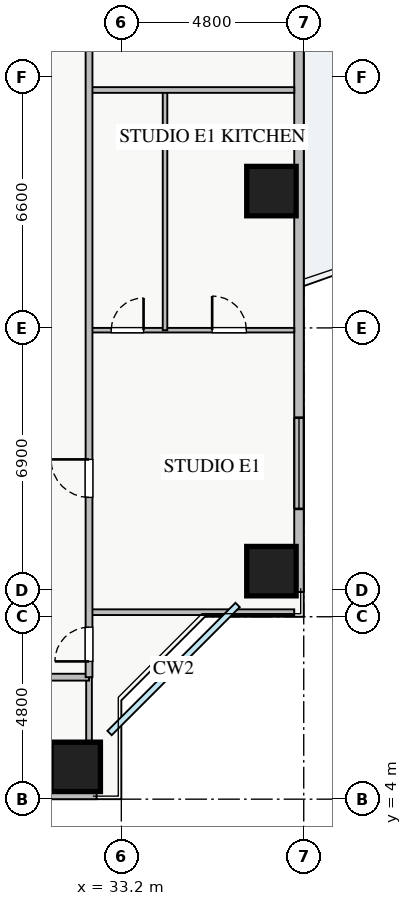
"""IFC4 building model, lengths in metres.
Left out: names, types, materials, properties, quantities, classifications, styles, units other than length and angle.
Written with IfcOpenShell. Run it as: python <this file> out.ifc"""

import sys

from ifc_helpers import new_model, si_unit, direction, frame, frame_2d, origin, origin_2d, place, context, subcontext, project, spatial, rectangle, extrude, source, transform, mapped, element, fill, save


model = new_model("IFC4")
c1 = context("Model", 3, precision=1e-05, world=origin(), true_north=direction((0.0, 1.0)))
c2 = subcontext(c1, "Body", "Model", "MODEL_VIEW")
j1 = project(units=[si_unit("LENGTHUNIT", "METRE"), si_unit("PLANEANGLEUNIT", "RADIAN")], contexts=[c1])
p1 = place(None, origin())
s1 = spatial("IfcSite", under=j1, at=p1, CompositionType="ELEMENT")
p2 = place(p1, origin())
s2 = spatial("IfcBuilding", under=s1, at=p2, CompositionType="ELEMENT")
p3 = place(p2, frame((0.0, 0.0, 89.25)))
s3 = spatial("IfcBuildingStorey", under=s2, at=p3, CompositionType="ELEMENT", Elevation=89.25)
m1 = source(origin(), c2, "Body", "SweptSolid", [
    extrude(rectangle(XDim=1.3, YDim=1.3, at=origin_2d()), origin(), (0.0, 0.0, 1.0), 3.25),
])
for number, where, z_axis, x_axis in (
    (1, (32.0, 4.85, 0.0), (0.0, 0.0, 1.0), (1.0, 0.0, 0.0)),
    (2, (37.15, 10.0, 0.0), (0.0, 0.0, 1.0), (1.0, 0.0, 0.0)),
    (3, (37.15, 20.0, 0.0), (0.0, 0.0, 1.0), (1.0, 0.0, 0.0)),
):
    element("IfcColumn", number, at=place(p3, frame(where, z_axis=z_axis, x_axis=x_axis)), inside=s3, PredefinedType="COLUMN", context=c2, shape_type="MappedRepresentation", body=[
        mapped(m1, transform((0.0, 0.0, 0.0), x_axis=(1.0, 0.0, 0.0), y_axis=(0.0, 1.0, 0.0), z_axis=(0.0, 0.0, 1.0), scale=1.0)),
    ])
p4 = place(p3, frame((5.45, 4.125, 0.0), z_axis=(0.0, 0.0, 1.0), x_axis=(1.0, 0.0, 0.0)))
e4 = element("IfcWall", 4, at=p4, inside=s3, PredefinedType="STANDARD", context=c2, shape_type="SweptSolid", body=[
    extrude(rectangle(XDim=27.1, YDim=0.25, at=frame_2d((13.55, 0.0))), origin(), (0.0, 0.0, 1.0), 2.57),
])
p5 = place(p4, frame((14.4, 0.0, 0.0)))
e5 = element("IfcOpeningElement", 5, at=p5, cuts=e4, PredefinedType="OPENING", context=c2, shape_type="SweptSolid", body=[
    extrude(rectangle(XDim=1.2, YDim=2.1, at=frame_2d((0.6, 1.05))), frame((0.0, 0.135, 0.0), z_axis=(0.0, -1.0, 0.0), x_axis=(1.0, 0.0, 0.0)), (0.0, 0.0, 1.0), 0.27),
])
p6 = place(p4, frame((1.45, 0.0, 0.9)))
e6 = element("IfcOpeningElement", 6, at=p6, cuts=e4, PredefinedType="OPENING", context=c2, shape_type="SweptSolid", body=[
    extrude(rectangle(XDim=1.5, YDim=1.5, at=frame_2d((0.75, 0.75))), frame((0.0, 0.135, 0.0), z_axis=(0.0, -1.0, 0.0), x_axis=(1.0, 0.0, 0.0)), (0.0, 0.0, 1.0), 0.27),
])
p7 = place(p4, frame((9.263, 0.0, 0.9)))
e7 = element("IfcOpeningElement", 7, at=p7, cuts=e4, PredefinedType="OPENING", context=c2, shape_type="SweptSolid", body=[
    extrude(rectangle(XDim=1.8, YDim=1.45, at=frame_2d((0.9, 0.725))), frame((0.0, 0.135, 0.0), z_axis=(0.0, -1.0, 0.0), x_axis=(1.0, 0.0, 0.0)), (0.0, 0.0, 1.0), 0.27),
])
p8 = place(p4, frame((16.188, 0.0, 0.9)))
e8 = element("IfcOpeningElement", 8, at=p8, cuts=e4, PredefinedType="OPENING", context=c2, shape_type="SweptSolid", body=[
    extrude(rectangle(XDim=1.5, YDim=1.45, at=frame_2d((0.75, 0.725))), frame((0.0, 0.135, 0.0), z_axis=(0.0, -1.0, 0.0), x_axis=(1.0, 0.0, 0.0)), (0.0, 0.0, 1.0), 0.27),
])
p9 = place(p4, frame((22.663, 0.0, 0.9)))
e9 = element("IfcOpeningElement", 9, at=p9, cuts=e4, PredefinedType="OPENING", context=c2, shape_type="SweptSolid", body=[
    extrude(rectangle(XDim=2.1, YDim=1.48, at=frame_2d((1.05, 0.74))), frame((0.0, 0.135, 0.0), z_axis=(0.0, -1.0, 0.0), x_axis=(1.0, 0.0, 0.0)), (0.0, 0.0, 1.0), 0.27),
])
p10 = place(p4, frame((5.084, 0.0, 0.9)))
e10 = element("IfcOpeningElement", 10, at=p10, cuts=e4, PredefinedType="OPENING", context=c2, shape_type="SweptSolid", body=[
    extrude(rectangle(XDim=2.4, YDim=1.5, at=frame_2d((1.2, 0.75))), frame((0.0, 0.135, 0.0), z_axis=(0.0, -1.0, 0.0), x_axis=(1.0, 0.0, 0.0)), (0.0, 0.0, 1.0), 0.27),
])
p11 = place(p3, frame((37.875, 9.45, 0.0), z_axis=(0.0, 0.0, 1.0), x_axis=(0.0, 1.0, 0.0)))
e11 = element("IfcWall", 11, at=p11, inside=s3, PredefinedType="STANDARD", context=c2, shape_type="SweptSolid", body=[
    extrude(rectangle(XDim=27.1, YDim=0.25, at=frame_2d((13.55, 0.0))), origin(), (0.0, 0.0, 1.0), 2.57),
])
p12 = place(p11, frame((14.4, 0.0, 0.0)))
e12 = element("IfcOpeningElement", 12, at=p12, cuts=e11, PredefinedType="OPENING", context=c2, shape_type="SweptSolid", body=[
    extrude(rectangle(XDim=1.2, YDim=2.1, at=frame_2d((0.6, 1.05))), frame((0.0, 0.135, 0.0), z_axis=(0.0, -1.0, 0.0), x_axis=(1.0, 0.0, 0.0)), (0.0, 0.0, 1.0), 0.27),
])
p13 = place(p11, frame((2.188, 0.0, 0.9)))
e13 = element("IfcOpeningElement", 13, at=p13, cuts=e11, PredefinedType="OPENING", context=c2, shape_type="SweptSolid", body=[
    extrude(rectangle(XDim=2.4, YDim=1.48, at=frame_2d((1.2, 0.74))), frame((0.0, 0.135, 0.0), z_axis=(0.0, -1.0, 0.0), x_axis=(1.0, 0.0, 0.0)), (0.0, 0.0, 1.0), 0.27),
])
p14 = place(p11, frame((22.663, 0.0, 0.9)))
e14 = element("IfcOpeningElement", 14, at=p14, cuts=e11, PredefinedType="OPENING", context=c2, shape_type="SweptSolid", body=[
    extrude(rectangle(XDim=2.1, YDim=1.48, at=frame_2d((1.05, 0.74))), frame((0.0, 0.135, 0.0), z_axis=(0.0, -1.0, 0.0), x_axis=(1.0, 0.0, 0.0)), (0.0, 0.0, 1.0), 0.27),
])
p15 = place(p11, frame((17.365, 0.0, 0.9)))
e15 = element("IfcOpeningElement", 15, at=p15, cuts=e11, PredefinedType="OPENING", context=c2, shape_type="SweptSolid", body=[
    extrude(rectangle(XDim=0.9, YDim=1.2, at=frame_2d((0.45, 0.6))), frame((0.0, 0.135, 0.0), z_axis=(0.0, -1.0, 0.0), x_axis=(1.0, 0.0, 0.0)), (0.0, 0.0, 1.0), 0.27),
])
p16 = place(p3, frame((32.35, 4.25, 0.0), z_axis=(0.0, 0.0, 1.0), x_axis=(0.0, 1.0, 0.0)))
e16 = element("IfcWall", 16, at=p16, inside=s3, PredefinedType="PARTITIONING", context=c2, shape_type="SweptSolid", body=[
    extrude(rectangle(XDim=2.96, YDim=0.15, at=frame_2d((1.48, 0.0))), origin(), (0.0, 0.0, 1.0), 3.03),
])
p17 = place(p3, frame((8.72, 7.21, 0.0), z_axis=(0.0, 0.0, 1.0), x_axis=(1.0, 0.0, 0.0)))
e17 = element("IfcWall", 17, at=p17, inside=s3, PredefinedType="PARTITIONING", context=c2, shape_type="SweptSolid", body=[
    extrude(rectangle(XDim=23.63, YDim=0.18, at=frame_2d((11.815, 0.0))), origin(), (0.0, 0.0, 1.0), 3.03),
])
p18 = place(p17, frame((3.81, 0.0, 0.0)))
e18 = element("IfcOpeningElement", 18, at=p18, cuts=e17, PredefinedType="OPENING", context=c2, shape_type="SweptSolid", body=[
    extrude(rectangle(XDim=1.0, YDim=2.05, at=frame_2d((0.5, 1.025))), frame((0.0, 0.1, 0.0), z_axis=(0.0, -1.0, 0.0), x_axis=(1.0, 0.0, 0.0)), (0.0, 0.0, 1.0), 0.2),
])
p19 = place(p17, frame((11.685, 0.0, 0.0)))
e19 = element("IfcOpeningElement", 19, at=p19, cuts=e17, PredefinedType="OPENING", context=c2, shape_type="SweptSolid", body=[
    extrude(rectangle(XDim=1.0, YDim=2.05, at=frame_2d((0.5, 1.025))), frame((0.0, 0.1, 0.0), z_axis=(0.0, -1.0, 0.0), x_axis=(1.0, 0.0, 0.0)), (0.0, 0.0, 1.0), 0.2),
])
p20 = place(p17, frame((19.19, 0.0, 0.0)))
e20 = element("IfcOpeningElement", 20, at=p20, cuts=e17, PredefinedType="OPENING", context=c2, shape_type="SweptSolid", body=[
    extrude(rectangle(XDim=1.0, YDim=2.05, at=frame_2d((0.5, 1.025))), frame((0.0, 0.1, 0.0), z_axis=(0.0, -1.0, 0.0), x_axis=(1.0, 0.0, 0.0)), (0.0, 0.0, 1.0), 0.2),
])
p21 = place(p3, frame((32.35, 8.92, 0.0), z_axis=(0.0, 0.0, 1.0), x_axis=(1.0, 0.0, 0.0)))
e21 = element("IfcWall", 21, at=p21, inside=s3, PredefinedType="PARTITIONING", context=c2, shape_type="SweptSolid", body=[
    extrude(rectangle(XDim=5.4, YDim=0.15, at=frame_2d((2.7, 0.0))), origin(), (0.0, 0.0, 1.0), 3.03),
])
p22 = place(p3, frame((32.35, 16.34, 0.0), z_axis=(0.0, 0.0, 1.0), x_axis=(1.0, 0.0, 0.0)))
e22 = element("IfcWall", 22, at=p22, inside=s3, PredefinedType="PLUMBINGWALL", context=c2, shape_type="SweptSolid", body=[
    extrude(rectangle(XDim=5.4, YDim=0.12, at=frame_2d((2.7, 0.0))), origin(), (0.0, 0.0, 1.0), 3.03),
])
p23 = place(p22, frame((0.585, 0.0, 0.0)))
e23 = element("IfcOpeningElement", 23, at=p23, cuts=e22, PredefinedType="OPENING", context=c2, shape_type="SweptSolid", body=[
    extrude(rectangle(XDim=0.85, YDim=2.05, at=frame_2d((0.425, 1.025))), frame((0.0, 0.07, 0.0), z_axis=(0.0, -1.0, 0.0), x_axis=(1.0, 0.0, 0.0)), (0.0, 0.0, 1.0), 0.14),
])
p24 = place(p22, frame((3.24, 0.0, 0.0)))
e24 = element("IfcOpeningElement", 24, at=p24, cuts=e22, PredefinedType="OPENING", context=c2, shape_type="SweptSolid", body=[
    extrude(rectangle(XDim=0.9, YDim=2.05, at=frame_2d((0.45, 1.025))), frame((0.0, 0.07, 0.0), z_axis=(0.0, -1.0, 0.0), x_axis=(1.0, 0.0, 0.0)), (0.0, 0.0, 1.0), 0.14),
])
p25 = place(p3, frame((34.35, 16.34, 0.0), z_axis=(0.0, 0.0, 1.0), x_axis=(0.0, 1.0, 0.0)))
e25 = element("IfcWall", 25, at=p25, inside=s3, PredefinedType="PLUMBINGWALL", context=c2, shape_type="SweptSolid", body=[
    extrude(rectangle(XDim=6.32, YDim=0.12, at=frame_2d((3.16, 0.0))), origin(), (0.0, 0.0, 1.0), 3.03),
])
p26 = place(p3, frame((32.35, 22.66, 0.0), z_axis=(0.0, 0.0, 1.0), x_axis=(1.0, 0.0, 0.0)))
e26 = element("IfcWall", 26, at=p26, inside=s3, PredefinedType="PARTITIONING", context=c2, shape_type="SweptSolid", body=[
    extrude(rectangle(XDim=5.4, YDim=0.15, at=frame_2d((2.7, 0.0))), origin(), (0.0, 0.0, 1.0), 3.03),
])
p27 = place(p3, frame((32.35, 7.21, 0.0), z_axis=(0.0, 0.0, 1.0), x_axis=(0.0, 1.0, 0.0)))
e27 = element("IfcWall", 27, at=p27, inside=s3, PredefinedType="PARTITIONING", context=c2, shape_type="SweptSolid", body=[
    extrude(rectangle(XDim=31.23, YDim=0.18, at=frame_2d((15.615, 0.0))), origin(), (0.0, 0.0, 1.0), 2.725),
])
p28 = place(p27, frame((30.09, 0.0, 0.0)))
e28 = element("IfcOpeningElement", 28, at=p28, cuts=e27, PredefinedType="OPENING", context=c2, shape_type="SweptSolid", body=[
    extrude(rectangle(XDim=0.9, YDim=2.05, at=frame_2d((0.45, 1.025))), frame((0.0, 0.1, 0.0), z_axis=(0.0, -1.0, 0.0), x_axis=(1.0, 0.0, 0.0)), (0.0, 0.0, 1.0), 0.2),
])
p29 = place(p27, frame((0.415, 0.0, 0.0)))
e29 = element("IfcOpeningElement", 29, at=p29, cuts=e27, PredefinedType="OPENING", context=c2, shape_type="SweptSolid", body=[
    extrude(rectangle(XDim=0.9, YDim=2.05, at=frame_2d((0.45, 1.025))), frame((0.0, 0.1, 0.0), z_axis=(0.0, -1.0, 0.0), x_axis=(1.0, 0.0, 0.0)), (0.0, 0.0, 1.0), 0.2),
])
p30 = place(p27, frame((4.73, 0.0, 0.0)))
e30 = element("IfcOpeningElement", 30, at=p30, cuts=e27, PredefinedType="OPENING", context=c2, shape_type="SweptSolid", body=[
    extrude(rectangle(XDim=1.0, YDim=2.05, at=frame_2d((0.5, 1.025))), frame((0.0, 0.1, 0.0), z_axis=(0.0, -1.0, 0.0), x_axis=(1.0, 0.0, 0.0)), (0.0, 0.0, 1.0), 0.2),
])
p31 = place(p27, frame((18.655, 0.0, 0.0)))
e31 = element("IfcOpeningElement", 31, at=p31, cuts=e27, PredefinedType="OPENING", context=c2, shape_type="SweptSolid", body=[
    extrude(rectangle(XDim=1.0, YDim=2.05, at=frame_2d((0.5, 1.025))), frame((0.0, 0.1, 0.0), z_axis=(0.0, -1.0, 0.0), x_axis=(1.0, 0.0, 0.0)), (0.0, 0.0, 1.0), 0.2),
])
m2 = source(origin(), c2, "Body", "SweptSolid", [
    extrude(rectangle(XDim=2.4, YDim=1.48, at=frame_2d((1.2, 0.74))), frame((0.0, 0.03, 0.0), z_axis=(0.0, -1.0, 0.0), x_axis=(1.0, 0.0, 0.0)), (0.0, 0.0, 1.0), 0.06),
])
p32 = place(p13, origin())
e32 = element("IfcWindow", 32, at=p32, inside=s3, PartitioningType="TRIPLE_PANEL_VERTICAL", PredefinedType="WINDOW", context=c2, shape_type="MappedRepresentation", body=[
    mapped(m2, transform((0.0, 0.0, 0.0), x_axis=(1.0, 0.0, 0.0), y_axis=(0.0, 1.0, 0.0), z_axis=(0.0, 0.0, 1.0), scale=1.0)),
])
fill(e13, e32)
m3 = source(origin(), c2, "Body", "SweptSolid", [
    extrude(rectangle(XDim=0.85, YDim=2.05, at=frame_2d((0.425, 1.025))), frame((0.0, 0.025, 0.0), z_axis=(0.0, -1.0, 0.0), x_axis=(1.0, 0.0, 0.0)), (0.0, 0.0, 1.0), 0.05),
])
p33 = place(p23, origin())
e33 = element("IfcDoor", 33, at=p33, inside=s3, OperationType="SINGLE_SWING_RIGHT", PredefinedType="DOOR", context=c2, shape_type="MappedRepresentation", body=[
    mapped(m3, transform((0.0, 0.0, 0.0), x_axis=(1.0, 0.0, 0.0), y_axis=(0.0, 1.0, 0.0), z_axis=(0.0, 0.0, 1.0), scale=1.0)),
])
fill(e23, e33)
m4 = source(origin(), c2, "Body", "SweptSolid", [
    extrude(rectangle(XDim=0.9, YDim=2.05, at=frame_2d((0.45, 1.025))), frame((0.0, 0.025, 0.0), z_axis=(0.0, -1.0, 0.0), x_axis=(1.0, 0.0, 0.0)), (0.0, 0.0, 1.0), 0.05),
])
p34 = place(p24, origin())
e34 = element("IfcDoor", 34, at=p34, inside=s3, OperationType="SINGLE_SWING_LEFT", PredefinedType="DOOR", context=c2, shape_type="MappedRepresentation", body=[
    mapped(m4, transform((0.0, 0.0, 0.0), x_axis=(1.0, 0.0, 0.0), y_axis=(0.0, 1.0, 0.0), z_axis=(0.0, 0.0, 1.0), scale=1.0)),
])
fill(e24, e34)
p35 = place(p29, origin())
e35 = element("IfcDoor", 35, at=p35, inside=s3, OperationType="SINGLE_SWING_LEFT", PredefinedType="DOOR", context=c2, shape_type="MappedRepresentation", body=[
    mapped(m4, transform((0.0, 0.0, 0.0), x_axis=(1.0, 0.0, 0.0), y_axis=(0.0, 1.0, 0.0), z_axis=(0.0, 0.0, 1.0), scale=1.0)),
])
fill(e29, e35)
m5 = source(origin(), c2, "Body", "SweptSolid", [
    extrude(rectangle(XDim=1.0, YDim=2.05, at=frame_2d((0.5, 1.025))), frame((0.0, 0.025, 0.0), z_axis=(0.0, -1.0, 0.0), x_axis=(1.0, 0.0, 0.0)), (0.0, 0.0, 1.0), 0.05),
])
p36 = place(p30, origin())
e36 = element("IfcDoor", 36, at=p36, inside=s3, OperationType="SINGLE_SWING_RIGHT", PredefinedType="DOOR", context=c2, shape_type="MappedRepresentation", body=[
    mapped(m5, transform((0.0, 0.0, 0.0), x_axis=(1.0, 0.0, 0.0), y_axis=(0.0, 1.0, 0.0), z_axis=(0.0, 0.0, 1.0), scale=1.0)),
])
fill(e30, e36)
save(model, sys.argv[1])
